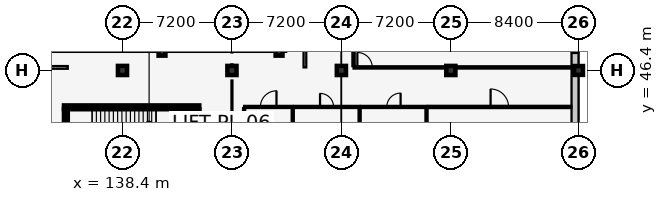
"""IFC4 building model, lengths in metres.
Left out: names, types, materials, properties, quantities, classifications, styles, units other than length and angle.
Written with IfcOpenShell. Run it as: python <this file> out.ifc"""

import sys

from ifc_helpers import new_model, si_unit, direction, frame, frame_2d, origin, origin_2d, place, context, subcontext, project, spatial, rectangle, extrude, element, fill, save


model = new_model("IFC4")
c1 = context("Model", 3, precision=1e-05, world=origin(), true_north=direction((0.0, 1.0)))
c2 = subcontext(c1, "Body", "Model", "MODEL_VIEW")
j1 = project(units=[si_unit("LENGTHUNIT", "METRE"), si_unit("PLANEANGLEUNIT", "RADIAN")], contexts=[c1])
p1 = place(None, origin())
s1 = spatial("IfcSite", under=j1, at=p1, CompositionType="ELEMENT")
p2 = place(p1, origin())
s2 = spatial("IfcBuilding", under=s1, at=p2, CompositionType="ELEMENT")
p3 = place(p2, origin())
s3 = spatial("IfcBuildingStorey", under=s2, at=p3, CompositionType="ELEMENT", Elevation=0.0)
for number, where, z_axis, x_axis in (
    (1, (138.4, 46.4, 0.0), (0.0, 0.0, 1.0), (1.0, 0.0, 0.0)),
    (2, (145.6, 46.4, 0.0), (0.0, 0.0, 1.0), (1.0, 0.0, 0.0)),
    (3, (152.8, 46.4, 0.0), (0.0, 0.0, 1.0), (1.0, 0.0, 0.0)),
    (4, (160.0, 46.4, 0.0), (0.0, 0.0, 1.0), (1.0, 0.0, 0.0)),
):
    element("IfcColumn", number, at=place(p3, frame(where, z_axis=z_axis, x_axis=x_axis)), inside=s3, PredefinedType="COLUMN", context=c2, shape_type="SweptSolid", body=[
        extrude(rectangle(XDim=0.6, YDim=0.6, at=origin_2d()), origin(), (0.0, 0.0, 1.0), 5.4),
    ])
p4 = place(p3, frame((168.4, 46.4, 0.0), z_axis=(0.0, 0.0, 1.0), x_axis=(1.0, 0.0, 0.0)))
e5 = element("IfcColumn", 5, at=p4, inside=s3, PredefinedType="COLUMN", context=c2, shape_type="SweptSolid", body=[
    extrude(rectangle(XDim=0.58, YDim=0.58, at=origin_2d()), origin(), (0.0, 0.0, 1.0), 5.4),
])
for number, where, z_axis, x_axis in (
    (6, (141.0, 47.6, -0.55), (0.0, 0.0, 1.0), (1.0, 0.0, 0.0)),
    (7, (148.7, 47.6, -0.55), (0.0, 0.0, 1.0), (1.0, 0.0, 0.0)),
):
    element("IfcColumn", number, at=place(p3, frame(where, z_axis=z_axis, x_axis=x_axis)), inside=s3, PredefinedType="COLUMN", context=c2, shape_type="SweptSolid", body=[
        extrude(rectangle(XDim=0.45, YDim=0.45, at=origin_2d()), origin(), (0.0, 0.0, 1.0), 0.985),
    ])
p5 = place(p3, frame((168.17, 68.0, 0.0), z_axis=(0.0, 0.0, 1.0), x_axis=(0.0, -1.0, 0.0)))
e8 = element("IfcWall", 8, at=p5, inside=s3, PredefinedType="SOLIDWALL", context=c2, shape_type="SweptSolid", body=[
    extrude(rectangle(XDim=28.8, YDim=0.46, at=frame_2d((14.4, 0.0))), origin(), (0.0, 0.0, 1.0), 4.555),
])
p6 = place(p5, frame((1.05, 0.0, 0.9)))
e9 = element("IfcOpeningElement", 9, at=p6, cuts=e8, PredefinedType="OPENING", context=c2, shape_type="SweptSolid", body=[
    extrude(rectangle(XDim=1.5, YDim=1.75, at=frame_2d((0.75, 0.875))), frame((0.0, 0.242, 0.0), z_axis=(0.0, -1.0, 0.0), x_axis=(1.0, 0.0, 0.0)), (0.0, 0.0, 1.0), 0.484),
])
p7 = place(p5, frame((4.95, 0.0, 0.9)))
e10 = element("IfcOpeningElement", 10, at=p7, cuts=e8, PredefinedType="OPENING", context=c2, shape_type="SweptSolid", body=[
    extrude(rectangle(XDim=0.9, YDim=1.35, at=frame_2d((0.45, 0.675))), frame((0.0, 0.242, 0.0), z_axis=(0.0, -1.0, 0.0), x_axis=(1.0, 0.0, 0.0)), (0.0, 0.0, 1.0), 0.484),
])
p8 = place(p5, frame((8.5, 0.0, 0.9)))
e11 = element("IfcOpeningElement", 11, at=p8, cuts=e8, PredefinedType="OPENING", context=c2, shape_type="SweptSolid", body=[
    extrude(rectangle(XDim=1.0, YDim=1.35, at=frame_2d((0.5, 0.675))), frame((0.0, 0.242, 0.0), z_axis=(0.0, -1.0, 0.0), x_axis=(1.0, 0.0, 0.0)), (0.0, 0.0, 1.0), 0.484),
])
p9 = place(p5, frame((12.05, 0.0, 0.9)))
e12 = element("IfcOpeningElement", 12, at=p9, cuts=e8, PredefinedType="OPENING", context=c2, shape_type="SweptSolid", body=[
    extrude(rectangle(XDim=1.1, YDim=1.35, at=frame_2d((0.55, 0.675))), frame((0.0, 0.242, 0.0), z_axis=(0.0, -1.0, 0.0), x_axis=(1.0, 0.0, 0.0)), (0.0, 0.0, 1.0), 0.484),
])
p10 = place(p5, frame((15.6, 0.0, 0.9)))
e13 = element("IfcOpeningElement", 13, at=p10, cuts=e8, PredefinedType="OPENING", context=c2, shape_type="SweptSolid", body=[
    extrude(rectangle(XDim=1.2, YDim=1.35, at=frame_2d((0.6, 0.675))), frame((0.0, 0.242, 0.0), z_axis=(0.0, -1.0, 0.0), x_axis=(1.0, 0.0, 0.0)), (0.0, 0.0, 1.0), 0.484),
])
p11 = place(p5, frame((19.15, 0.0, 0.9)))
e14 = element("IfcOpeningElement", 14, at=p11, cuts=e8, PredefinedType="OPENING", context=c2, shape_type="SweptSolid", body=[
    extrude(rectangle(XDim=1.3, YDim=1.35, at=frame_2d((0.65, 0.675))), frame((0.0, 0.242, 0.0), z_axis=(0.0, -1.0, 0.0), x_axis=(1.0, 0.0, 0.0)), (0.0, 0.0, 1.0), 0.484),
])
p12 = place(p5, frame((26.525, 0.0, 0.9)))
e15 = element("IfcOpeningElement", 15, at=p12, cuts=e8, PredefinedType="OPENING", context=c2, shape_type="SweptSolid", body=[
    extrude(rectangle(XDim=0.95, YDim=1.45, at=frame_2d((0.475, 0.725))), frame((0.0, 0.242, 0.0), z_axis=(0.0, -1.0, 0.0), x_axis=(1.0, 0.0, 0.0)), (0.0, 0.0, 1.0), 0.484),
])
p13 = place(p3, frame((143.45, 43.975, 0.0), z_axis=(0.0, 0.0, 1.0), x_axis=(-1.0, 0.0, 0.0)))
e16 = element("IfcWall", 16, at=p13, inside=s3, PredefinedType="SHEAR", context=c2, shape_type="SweptSolid", body=[
    extrude(rectangle(XDim=8.9, YDim=0.25, at=frame_2d((4.45, 0.0))), origin(), (0.0, 0.0, 1.0), 5.16),
])
p14 = place(p3, frame((134.675, 43.85, 0.0), z_axis=(0.0, 0.0, 1.0), x_axis=(0.0, -1.0, 0.0)))
e17 = element("IfcWall", 17, at=p14, inside=s3, PredefinedType="SHEAR", context=c2, shape_type="SweptSolid", body=[
    extrude(rectangle(XDim=3.45, YDim=0.25, at=frame_2d((1.725, 0.0))), origin(), (0.0, 0.0, 1.0), 5.16),
])
p15 = place(p14, frame((1.125, 0.0, 0.0)))
e18 = element("IfcOpeningElement", 18, at=p15, cuts=e17, PredefinedType="OPENING", context=c2, shape_type="SweptSolid", body=[
    extrude(rectangle(XDim=1.2, YDim=2.15, at=frame_2d((0.6, 1.075))), frame((0.0, 0.137, 0.0), z_axis=(0.0, -1.0, 0.0), x_axis=(1.0, 0.0, 0.0)), (0.0, 0.0, 1.0), 0.274),
])
p16 = place(p3, frame((143.325, 40.4, 0.0), z_axis=(0.0, 0.0, 1.0), x_axis=(0.0, 1.0, 0.0)))
e19 = element("IfcWall", 19, at=p16, inside=s3, PredefinedType="SHEAR", context=c2, shape_type="SweptSolid", body=[
    extrude(rectangle(XDim=3.45, YDim=0.25, at=frame_2d((1.725, 0.0))), origin(), (0.0, 0.0, 1.0), 5.16),
])
p17 = place(p3, frame((131.615, 46.6, 0.0), z_axis=(0.0, 0.0, 1.0), x_axis=(1.0, 0.0, 0.0)))
e20 = element("IfcWall", 20, at=p17, inside=s3, PredefinedType="PARTITIONING", context=c2, shape_type="SweptSolid", body=[
    extrude(rectangle(XDim=3.185, YDim=0.18, at=frame_2d((1.593, 0.0))), origin(), (0.0, 0.0, 1.0), 4.285),
])
p18 = place(p3, frame((150.4, 46.6, 0.0), z_axis=(0.0, 0.0, 1.0), x_axis=(0.0, 1.0, 0.0)))
e21 = element("IfcWall", 21, at=p18, inside=s3, PredefinedType="PARTITIONING", context=c2, shape_type="SweptSolid", body=[
    extrude(rectangle(XDim=20.93, YDim=0.18, at=frame_2d((10.465, 0.0))), origin(), (0.0, 0.0, 1.0), 5.16),
])
p19 = place(p18, frame((6.32, 0.0, 0.0)))
e22 = element("IfcOpeningElement", 22, at=p19, cuts=e21, PredefinedType="OPENING", context=c2, shape_type="SweptSolid", body=[
    extrude(rectangle(XDim=1.56, YDim=2.25, at=frame_2d((0.78, 1.125))), frame((0.0, 0.102, 0.0), z_axis=(0.0, -1.0, 0.0), x_axis=(1.0, 0.0, 0.0)), (0.0, 0.0, 1.0), 0.204),
])
p20 = place(p18, frame((16.725, 0.0, 0.0)))
e23 = element("IfcOpeningElement", 23, at=p20, cuts=e21, PredefinedType="OPENING", context=c2, shape_type="SweptSolid", body=[
    extrude(rectangle(XDim=1.68, YDim=2.3, at=frame_2d((0.84, 1.15))), frame((0.0, 0.102, 0.0), z_axis=(0.0, -1.0, 0.0), x_axis=(1.0, 0.0, 0.0)), (0.0, 0.0, 1.0), 0.204),
])
p21 = place(p3, frame((153.6, 46.6, 0.0), z_axis=(0.0, 0.0, 1.0), x_axis=(1.0, 0.0, 0.0)))
e24 = element("IfcWall", 24, at=p21, inside=s3, PredefinedType="PARTITIONING", context=c2, shape_type="SweptSolid", body=[
    extrude(rectangle(XDim=14.33, YDim=0.15, at=frame_2d((7.165, 0.0))), origin(), (0.0, 0.0, 1.0), 4.185),
])
p22 = place(p21, frame((0.25, 0.0, 0.0)))
e25 = element("IfcOpeningElement", 25, at=p22, cuts=e24, PredefinedType="OPENING", context=c2, shape_type="SweptSolid", body=[
    extrude(rectangle(XDim=0.98, YDim=2.12, at=frame_2d((0.49, 1.06))), frame((0.0, 0.087, 0.0), z_axis=(0.0, -1.0, 0.0), x_axis=(1.0, 0.0, 0.0)), (0.0, 0.0, 1.0), 0.174),
])
p23 = place(p3, frame((153.6, 46.685, 0.0), z_axis=(0.0, 0.0, 1.0), x_axis=(0.0, 1.0, 0.0)))
e26 = element("IfcWall", 26, at=p23, inside=s3, PredefinedType="PARTITIONING", context=c2, shape_type="SweptSolid", body=[
    extrude(rectangle(XDim=14.03, YDim=0.15, at=frame_2d((7.015, 0.0))), origin(), (0.0, 0.0, 1.0), 5.16),
])
p24 = place(p3, frame((146.4, 44.0, 0.0), z_axis=(0.0, 0.0, 1.0), x_axis=(1.0, 0.0, 0.0)))
e27 = element("IfcWall", 27, at=p24, inside=s3, PredefinedType="PARTITIONING", context=c2, shape_type="SweptSolid", body=[
    extrude(rectangle(XDim=3.2, YDim=0.14, at=frame_2d((1.6, 0.0))), origin(), (0.0, 0.0, 1.0), 5.16),
])
p25 = place(p24, frame((1.07, 0.0, 0.0)))
e28 = element("IfcOpeningElement", 28, at=p25, cuts=e27, PredefinedType="OPENING", context=c2, shape_type="SweptSolid", body=[
    extrude(rectangle(XDim=1.06, YDim=2.1, at=frame_2d((0.53, 1.05))), frame((0.0, 0.082, 0.0), z_axis=(0.0, -1.0, 0.0), x_axis=(1.0, 0.0, 0.0)), (0.0, 0.0, 1.0), 0.164),
])
for number, where, z_axis, x_axis in (
    (29, (146.4, 39.67, 0.0), (0.0, 0.0, 1.0), (0.0, 1.0, 0.0)),
    (30, (149.6, 39.67, 0.0), (0.0, 0.0, 1.0), (0.0, 1.0, 0.0)),
):
    element("IfcWall", number, at=place(p3, frame(where, z_axis=z_axis, x_axis=x_axis)), inside=s3, PredefinedType="PARTITIONING", context=c2, shape_type="SweptSolid", body=[
        extrude(rectangle(XDim=4.25, YDim=0.14, at=frame_2d((2.125, 0.0))), origin(), (0.0, 0.0, 1.0), 5.16),
    ])
p26 = place(p3, frame((149.68, 44.0, 0.0), z_axis=(0.0, 0.0, 1.0), x_axis=(1.0, 0.0, 0.0)))
e31 = element("IfcWall", 31, at=p26, inside=s3, PredefinedType="PARTITIONING", context=c2, shape_type="SweptSolid", body=[
    extrude(rectangle(XDim=4.32, YDim=0.14, at=frame_2d((2.16, 0.0))), origin(), (0.0, 0.0, 1.0), 5.16),
])
p27 = place(p26, frame((1.715, 0.0, 0.0)))
e32 = element("IfcOpeningElement", 32, at=p27, cuts=e31, PredefinedType="OPENING", context=c2, shape_type="SweptSolid", body=[
    extrude(rectangle(XDim=0.89, YDim=2.05, at=frame_2d((0.445, 1.025))), frame((0.0, 0.082, 0.0), z_axis=(0.0, -1.0, 0.0), x_axis=(1.0, 0.0, 0.0)), (0.0, 0.0, 1.0), 0.164),
])
p28 = place(p3, frame((154.0, 39.67, 0.0), z_axis=(0.0, 0.0, 1.0), x_axis=(0.0, 1.0, 0.0)))
e33 = element("IfcWall", 33, at=p28, inside=s3, PredefinedType="PARTITIONING", context=c2, shape_type="SweptSolid", body=[
    extrude(rectangle(XDim=4.25, YDim=0.14, at=frame_2d((2.125, 0.0))), origin(), (0.0, 0.0, 1.0), 5.16),
])
p29 = place(p3, frame((154.08, 44.0, 0.0), z_axis=(0.0, 0.0, 1.0), x_axis=(1.0, 0.0, 0.0)))
e34 = element("IfcWall", 34, at=p29, inside=s3, PredefinedType="PARTITIONING", context=c2, shape_type="SweptSolid", body=[
    extrude(rectangle(XDim=4.32, YDim=0.14, at=frame_2d((2.16, 0.0))), origin(), (0.0, 0.0, 1.0), 5.16),
])
p30 = place(p29, frame((1.705, 0.0, 0.0)))
e35 = element("IfcOpeningElement", 35, at=p30, cuts=e34, PredefinedType="OPENING", context=c2, shape_type="SweptSolid", body=[
    extrude(rectangle(XDim=0.91, YDim=2.06, at=frame_2d((0.455, 1.03))), frame((0.0, 0.082, 0.0), z_axis=(0.0, -1.0, 0.0), x_axis=(1.0, 0.0, 0.0)), (0.0, 0.0, 1.0), 0.164),
])
p31 = place(p3, frame((158.4, 39.67, 0.0), z_axis=(0.0, 0.0, 1.0), x_axis=(0.0, 1.0, 0.0)))
e36 = element("IfcWall", 36, at=p31, inside=s3, PredefinedType="PARTITIONING", context=c2, shape_type="SweptSolid", body=[
    extrude(rectangle(XDim=4.25, YDim=0.14, at=frame_2d((2.125, 0.0))), origin(), (0.0, 0.0, 1.0), 5.16),
])
p32 = place(p3, frame((158.48, 44.0, 0.0), z_axis=(0.0, 0.0, 1.0), x_axis=(1.0, 0.0, 0.0)))
e37 = element("IfcWall", 37, at=p32, inside=s3, PredefinedType="PARTITIONING", context=c2, shape_type="SweptSolid", body=[
    extrude(rectangle(XDim=9.45, YDim=0.15, at=frame_2d((4.725, 0.0))), origin(), (0.0, 0.0, 1.0), 5.16),
])
p33 = place(p32, frame((4.135, 0.0, 0.0)))
e38 = element("IfcOpeningElement", 38, at=p33, cuts=e37, PredefinedType="OPENING", context=c2, shape_type="SweptSolid", body=[
    extrude(rectangle(XDim=1.18, YDim=2.2, at=frame_2d((0.59, 1.1))), frame((0.0, 0.087, 0.0), z_axis=(0.0, -1.0, 0.0), x_axis=(1.0, 0.0, 0.0)), (0.0, 0.0, 1.0), 0.174),
])
p34 = place(p11, origin())
e39 = element("IfcWindow", 39, at=p34, inside=s3, PartitioningType="SINGLE_PANEL", PredefinedType="WINDOW", context=c2, shape_type="SweptSolid", body=[
    extrude(rectangle(XDim=1.3, YDim=1.35, at=frame_2d((0.65, 0.675))), frame((0.0, 0.03, 0.0), z_axis=(0.0, -1.0, 0.0), x_axis=(1.0, 0.0, 0.0)), (0.0, 0.0, 1.0), 0.06),
])
fill(e14, e39)
p35 = place(p22, origin())
e40 = element("IfcDoor", 40, at=p35, inside=s3, OperationType="SINGLE_SWING_LEFT", PredefinedType="DOOR", context=c2, shape_type="SweptSolid", body=[
    extrude(rectangle(XDim=0.98, YDim=2.12, at=frame_2d((0.49, 1.06))), frame((0.0, 0.025, 0.0), z_axis=(0.0, -1.0, 0.0), x_axis=(1.0, 0.0, 0.0)), (0.0, 0.0, 1.0), 0.05),
])
fill(e25, e40)
p36 = place(p25, origin())
e41 = element("IfcDoor", 41, at=p36, inside=s3, OperationType="SINGLE_SWING_RIGHT", PredefinedType="DOOR", context=c2, shape_type="SweptSolid", body=[
    extrude(rectangle(XDim=1.06, YDim=2.1, at=frame_2d((0.53, 1.05))), frame((0.0, 0.025, 0.0), z_axis=(0.0, -1.0, 0.0), x_axis=(1.0, 0.0, 0.0)), (0.0, 0.0, 1.0), 0.05),
])
fill(e28, e41)
p37 = place(p27, origin())
e42 = element("IfcDoor", 42, at=p37, inside=s3, OperationType="SINGLE_SWING_LEFT", PredefinedType="DOOR", context=c2, shape_type="SweptSolid", body=[
    extrude(rectangle(XDim=0.89, YDim=2.05, at=frame_2d((0.445, 1.025))), frame((0.0, 0.025, 0.0), z_axis=(0.0, -1.0, 0.0), x_axis=(1.0, 0.0, 0.0)), (0.0, 0.0, 1.0), 0.05),
])
fill(e32, e42)
p38 = place(p30, origin())
e43 = element("IfcDoor", 43, at=p38, inside=s3, OperationType="SINGLE_SWING_RIGHT", PredefinedType="DOOR", context=c2, shape_type="SweptSolid", body=[
    extrude(rectangle(XDim=0.91, YDim=2.06, at=frame_2d((0.455, 1.03))), frame((0.0, 0.025, 0.0), z_axis=(0.0, -1.0, 0.0), x_axis=(1.0, 0.0, 0.0)), (0.0, 0.0, 1.0), 0.05),
])
fill(e35, e43)
p39 = place(p33, origin())
e44 = element("IfcDoor", 44, at=p39, inside=s3, OperationType="SINGLE_SWING_LEFT", PredefinedType="DOOR", context=c2, shape_type="SweptSolid", body=[
    extrude(rectangle(XDim=1.18, YDim=2.2, at=frame_2d((0.59, 1.1))), frame((0.0, 0.025, 0.0), z_axis=(0.0, -1.0, 0.0), x_axis=(1.0, 0.0, 0.0)), (0.0, 0.0, 1.0), 0.05),
])
fill(e38, e44)
save(model, sys.argv[1])
